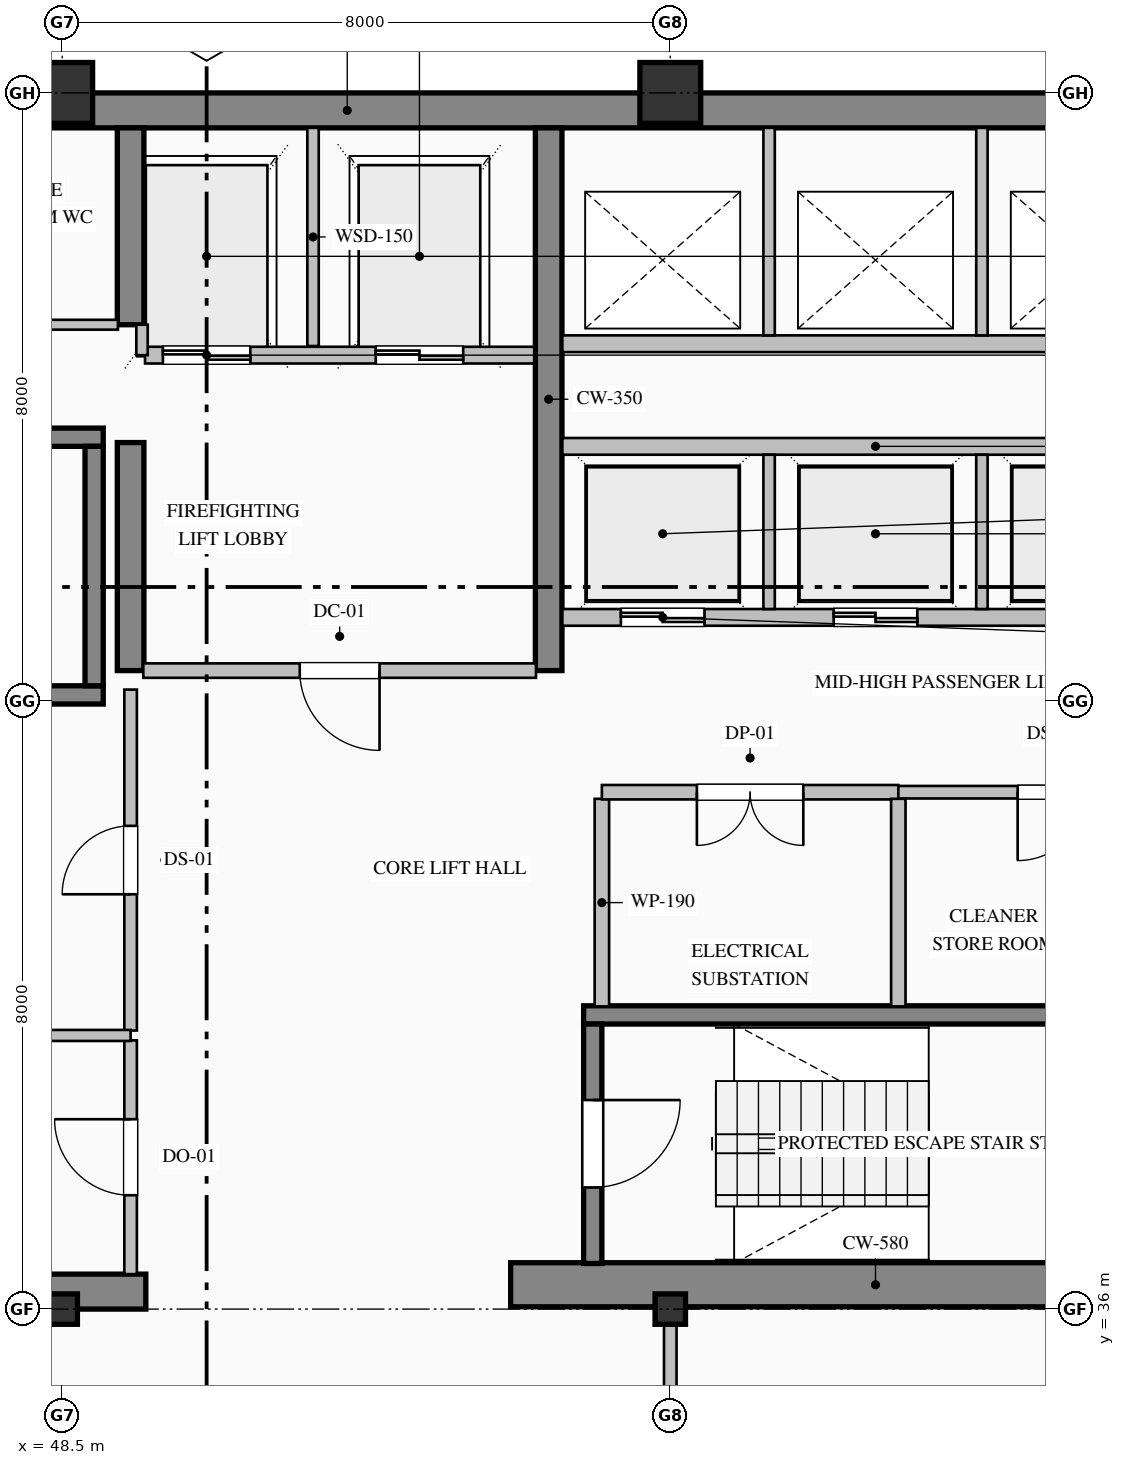
"""IFC4 building model, lengths in metres.
Left out: names, types, materials, properties, quantities, classifications, styles, units other than length and angle.
Written with IfcOpenShell. Run it as: python <this file> out.ifc"""

import sys

from ifc_helpers import new_model, si_unit, direction, frame, frame_2d, origin, origin_2d, place, context, subcontext, project, spatial, rectangle, hollow_rectangle, i_section, extrude, element, fill, save


model = new_model("IFC4")
c1 = context("Model", 3, precision=1e-05, world=origin(), true_north=direction((0.0, 1.0)))
c2 = subcontext(c1, "Body", "Model", "MODEL_VIEW")
j1 = project(units=[si_unit("LENGTHUNIT", "METRE"), si_unit("PLANEANGLEUNIT", "RADIAN")], contexts=[c1])
p1 = place(None, origin())
s1 = spatial("IfcSite", under=j1, at=p1, CompositionType="ELEMENT")
p2 = place(p1, origin())
s2 = spatial("IfcBuilding", under=s1, at=p2, CompositionType="ELEMENT")
p3 = place(p2, frame((0.0, 0.0, 233.8)))
s3 = spatial("IfcBuildingStorey", under=s2, at=p3, CompositionType="ELEMENT", Elevation=233.8)
p4 = place(p3, frame((40.5, 51.77, 0.0), z_axis=(0.0, 0.0, 1.0), x_axis=(1.0, 0.0, 0.0)))
e1 = element("IfcWall", 1, at=p4, inside=s3, PredefinedType="SHEAR", context=c2, shape_type="SweptSolid", body=[
    extrude(rectangle(XDim=23.5, YDim=0.46, at=frame_2d((11.75, 0.0))), origin(), (0.0, 0.0, 1.0), 3.775),
])
p5 = place(p3, frame((40.5, 36.23, 0.0), z_axis=(0.0, 0.0, 1.0), x_axis=(1.0, 0.0, 0.0)))
e2 = element("IfcWall", 2, at=p5, inside=s3, PredefinedType="SHEAR", context=c2, shape_type="SweptSolid", body=[
    extrude(rectangle(XDim=9.1, YDim=0.46, at=frame_2d((4.55, 0.0))), origin(), (0.0, 0.0, 1.0), 3.775),
])
p6 = place(p3, frame((54.4, 36.32, 0.0), z_axis=(0.0, 0.0, 1.0), x_axis=(1.0, 0.0, 0.0)))
e3 = element("IfcWall", 3, at=p6, inside=s3, PredefinedType="SHEAR", context=c2, shape_type="SweptSolid", body=[
    extrude(rectangle(XDim=9.6, YDim=0.58, at=frame_2d((4.8, 0.0))), origin(), (0.0, 0.0, 1.0), 4.0),
])
p7 = place(p3, frame((49.4, 44.4, 0.0), z_axis=(0.0, 0.0, 1.0), x_axis=(0.0, 1.0, 0.0)))
e4 = element("IfcWall", 4, at=p7, inside=s3, PredefinedType="SHEAR", context=c2, shape_type="SweptSolid", body=[
    extrude(rectangle(XDim=3.0, YDim=0.35, at=frame_2d((1.5, 0.0))), origin(), (0.0, 0.0, 1.0), 3.775),
])
p8 = place(p3, frame((49.4, 48.95, 0.0), z_axis=(0.0, 0.0, 1.0), x_axis=(0.0, 1.0, 0.0)))
e5 = element("IfcWall", 5, at=p8, inside=s3, PredefinedType="SHEAR", context=c2, shape_type="SweptSolid", body=[
    extrude(rectangle(XDim=2.59, YDim=0.35, at=frame_2d((1.295, 0.0))), origin(), (0.0, 0.0, 1.0), 3.775),
])
p9 = place(p3, frame((54.9, 44.4, 0.0), z_axis=(0.0, 0.0, 1.0), x_axis=(0.0, 1.0, 0.0)))
e6 = element("IfcWall", 6, at=p9, inside=s3, PredefinedType="SHEAR", context=c2, shape_type="SweptSolid", body=[
    extrude(rectangle(XDim=7.14, YDim=0.35, at=frame_2d((3.57, 0.0))), origin(), (0.0, 0.0, 1.0), 3.775),
])
p10 = place(p3, frame((48.5, 36.0, 0.0), z_axis=(0.0, 0.0, 1.0), x_axis=(1.0, 0.0, 0.0)))
e7 = element("IfcColumn", 7, at=p10, inside=s3, PredefinedType="COLUMN", context=c2, shape_type="SweptSolid", body=[
    extrude(i_section(OverallWidth=0.4, OverallDepth=0.4, WebThickness=0.013, FlangeThickness=0.021, FilletRadius=0.022, at=origin_2d()), origin(), (0.0, 0.0, 1.0), 4.0),
])
p11 = place(p3, frame((48.5, 52.0, 0.0), z_axis=(0.0, 0.0, 1.0), x_axis=(1.0, 0.0, 0.0)))
e8 = element("IfcColumn", 8, at=p11, inside=s3, PredefinedType="COLUMN", context=c2, shape_type="SweptSolid", body=[
    extrude(hollow_rectangle(XDim=0.8, YDim=0.8, WallThickness=0.032, at=origin_2d()), origin(), (0.0, 0.0, 1.0), 4.0),
])
p12 = place(p3, frame((56.5, 36.0, 0.0), z_axis=(0.0, 0.0, 1.0), x_axis=(1.0, 0.0, 0.0)))
e9 = element("IfcColumn", 9, at=p12, inside=s3, PredefinedType="COLUMN", context=c2, shape_type="SweptSolid", body=[
    extrude(i_section(OverallWidth=0.4, OverallDepth=0.4, WebThickness=0.013, FlangeThickness=0.021, FilletRadius=0.022, at=origin_2d()), origin(), (0.0, 0.0, 1.0), 4.0),
])
p13 = place(p3, frame((56.5, 52.0, 0.0), z_axis=(0.0, 0.0, 1.0), x_axis=(1.0, 0.0, 0.0)))
e10 = element("IfcColumn", 10, at=p13, inside=s3, PredefinedType="COLUMN", context=c2, shape_type="SweptSolid", body=[
    extrude(hollow_rectangle(XDim=0.8, YDim=0.8, WallThickness=0.032, at=origin_2d()), origin(), (0.0, 0.0, 1.0), 4.0),
])
for number, where, z_axis, x_axis in (
    (11, (40.96, 47.47, 0.0), (0.0, 0.0, 1.0), (1.0, 0.0, 0.0)),
    (12, (49.04, 44.08, 0.0), (0.0, 0.0, 1.0), (-1.0, 0.0, 0.0)),
):
    element("IfcWall", number, at=place(p3, frame(where, z_axis=z_axis, x_axis=x_axis)), inside=s3, PredefinedType="SOLIDWALL", context=c2, shape_type="SweptSolid", body=[
        extrude(rectangle(XDim=8.08, YDim=0.24, at=frame_2d((4.04, 0.0))), origin(), (0.0, 0.0, 1.0), 4.0),
    ])
p14 = place(p3, frame((48.92, 44.2, 0.0), z_axis=(0.0, 0.0, 1.0), x_axis=(0.0, 1.0, 0.0)))
e13 = element("IfcWall", 13, at=p14, inside=s3, PredefinedType="SOLIDWALL", context=c2, shape_type="SweptSolid", body=[
    extrude(rectangle(XDim=3.15, YDim=0.24, at=frame_2d((1.575, 0.0))), origin(), (0.0, 0.0, 1.0), 4.0),
])
p15 = place(p3, frame((55.36, 39.87, 0.0), z_axis=(0.0, 0.0, 1.0), x_axis=(1.0, 0.0, 0.0)))
e14 = element("IfcWall", 14, at=p15, inside=s3, PredefinedType="SOLIDWALL", context=c2, shape_type="SweptSolid", body=[
    extrude(rectangle(XDim=8.08, YDim=0.24, at=frame_2d((4.04, 0.0))), origin(), (0.0, 0.0, 1.0), 4.0),
])
p16 = place(p3, frame((55.48, 39.75, 0.0), z_axis=(0.0, 0.0, 1.0), x_axis=(0.0, -1.0, 0.0)))
e15 = element("IfcWall", 15, at=p16, inside=s3, PredefinedType="SOLIDWALL", context=c2, shape_type="SweptSolid", body=[
    extrude(rectangle(XDim=3.15, YDim=0.24, at=frame_2d((1.575, 0.0))), origin(), (0.0, 0.0, 1.0), 4.0),
])
p17 = place(p16, frame((1.0, 0.0, 0.0)))
e16 = element("IfcOpeningElement", 16, at=p17, cuts=e15, PredefinedType="OPENING", context=c2, shape_type="SweptSolid", body=[
    extrude(rectangle(XDim=1.15, YDim=2.2, at=frame_2d((0.575, 1.1))), frame((0.0, 0.13, 0.0), z_axis=(0.0, -1.0, 0.0), x_axis=(1.0, 0.0, 0.0)), (0.0, 0.0, 1.0), 0.26),
])
p18 = place(p3, frame((54.71, 48.55, 0.0), z_axis=(0.0, 0.0, 1.0), x_axis=(-1.0, 0.0, 0.0)))
e17 = element("IfcWall", 17, at=p18, inside=s3, PredefinedType="PARTITIONING", context=c2, shape_type="SweptSolid", body=[
    extrude(rectangle(XDim=5.12, YDim=0.22, at=frame_2d((2.56, 0.0))), origin(), (0.0, 0.0, 1.0), 3.775),
])
p19 = place(p18, frame((3.735, 0.0, 0.0)))
e18 = element("IfcOpeningElement", 18, at=p19, cuts=e17, PredefinedType="OPENING", context=c2, shape_type="SweptSolid", body=[
    extrude(rectangle(XDim=1.15, YDim=2.2, at=frame_2d((0.575, 1.1))), frame((0.0, 0.12, 0.0), z_axis=(0.0, -1.0, 0.0), x_axis=(1.0, 0.0, 0.0)), (0.0, 0.0, 1.0), 0.24),
])
p20 = place(p18, frame((0.935, 0.0, 0.0)))
e19 = element("IfcOpeningElement", 19, at=p20, cuts=e17, PredefinedType="OPENING", context=c2, shape_type="SweptSolid", body=[
    extrude(rectangle(XDim=1.15, YDim=2.2, at=frame_2d((0.575, 1.1))), frame((0.0, 0.12, 0.0), z_axis=(0.0, -1.0, 0.0), x_axis=(1.0, 0.0, 0.0)), (0.0, 0.0, 1.0), 0.24),
])
p21 = place(p3, frame((51.8, 48.67, 0.0), z_axis=(0.0, 0.0, 1.0), x_axis=(0.0, 1.0, 0.0)))
e20 = element("IfcWall", 20, at=p21, inside=s3, PredefinedType="PARTITIONING", context=c2, shape_type="SweptSolid", body=[
    extrude(rectangle(XDim=2.87, YDim=0.15, at=frame_2d((1.435, 0.0))), origin(), (0.0, 0.0, 1.0), 3.775),
])
p22 = place(p3, frame((49.55, 48.55, 0.0), z_axis=(0.0, 0.0, 1.0), x_axis=(0.0, 1.0, 0.0)))
e21 = element("IfcWall", 21, at=p22, inside=s3, PredefinedType="PARTITIONING", context=c2, shape_type="SweptSolid", body=[
    extrude(rectangle(XDim=0.4, YDim=0.15, at=frame_2d((0.2, 0.0))), origin(), (0.0, 0.0, 1.0), 3.775),
])
p23 = place(p3, frame((63.32, 45.1, 0.0), z_axis=(0.0, 0.0, 1.0), x_axis=(-1.0, 0.0, 0.0)))
e22 = element("IfcWall", 22, at=p23, inside=s3, PredefinedType="PARTITIONING", context=c2, shape_type="SweptSolid", body=[
    extrude(rectangle(XDim=8.24, YDim=0.22, at=frame_2d((4.12, 0.0))), origin(), (0.0, 0.0, 1.0), 3.775),
])
p24 = place(p23, frame((6.37, 0.0, 0.0)))
e23 = element("IfcOpeningElement", 23, at=p24, cuts=e22, PredefinedType="OPENING", context=c2, shape_type="SweptSolid", body=[
    extrude(rectangle(XDim=1.1, YDim=2.2, at=frame_2d((0.55, 1.1))), frame((0.0, 0.12, 0.0), z_axis=(0.0, -1.0, 0.0), x_axis=(1.0, 0.0, 0.0)), (0.0, 0.0, 1.0), 0.24),
])
p25 = place(p23, frame((3.57, 0.0, 0.0)))
e24 = element("IfcOpeningElement", 24, at=p25, cuts=e22, PredefinedType="OPENING", context=c2, shape_type="SweptSolid", body=[
    extrude(rectangle(XDim=1.1, YDim=2.2, at=frame_2d((0.55, 1.1))), frame((0.0, 0.12, 0.0), z_axis=(0.0, -1.0, 0.0), x_axis=(1.0, 0.0, 0.0)), (0.0, 0.0, 1.0), 0.24),
])
p26 = place(p23, frame((0.77, 0.0, 0.0)))
e25 = element("IfcOpeningElement", 25, at=p26, cuts=e22, PredefinedType="OPENING", context=c2, shape_type="SweptSolid", body=[
    extrude(rectangle(XDim=1.1, YDim=2.2, at=frame_2d((0.55, 1.1))), frame((0.0, 0.12, 0.0), z_axis=(0.0, -1.0, 0.0), x_axis=(1.0, 0.0, 0.0)), (0.0, 0.0, 1.0), 0.24),
])
p27 = place(p3, frame((55.08, 47.35, 0.0), z_axis=(0.0, 0.0, 1.0), x_axis=(1.0, 0.0, 0.0)))
e26 = element("IfcWall", 26, at=p27, inside=s3, PredefinedType="PARTITIONING", context=c2, shape_type="SweptSolid", body=[
    extrude(rectangle(XDim=8.24, YDim=0.22, at=frame_2d((4.12, 0.0))), origin(), (0.0, 0.0, 1.0), 3.775),
])
for number, where, z_axis, x_axis in (
    (27, (57.8, 45.21, 0.0), (0.0, 0.0, 1.0), (0.0, 1.0, 0.0)),
    (28, (60.6, 45.21, 0.0), (0.0, 0.0, 1.0), (0.0, 1.0, 0.0)),
):
    element("IfcWall", number, at=place(p3, frame(where, z_axis=z_axis, x_axis=x_axis)), inside=s3, PredefinedType="PARTITIONING", context=c2, shape_type="SweptSolid", body=[
        extrude(rectangle(XDim=2.03, YDim=0.15, at=frame_2d((1.015, 0.0))), origin(), (0.0, 0.0, 1.0), 3.775),
    ])
p28 = place(p3, frame((63.32, 48.7, 0.0), z_axis=(0.0, 0.0, 1.0), x_axis=(-1.0, 0.0, 0.0)))
e29 = element("IfcWall", 29, at=p28, inside=s3, PredefinedType="PARTITIONING", context=c2, shape_type="SweptSolid", body=[
    extrude(rectangle(XDim=8.24, YDim=0.22, at=frame_2d((4.12, 0.0))), origin(), (0.0, 0.0, 1.0), 3.775),
])
for number, where, z_axis, x_axis in (
    (30, (57.8, 48.81, 0.0), (0.0, 0.0, 1.0), (0.0, 1.0, 0.0)),
    (31, (60.6, 48.81, 0.0), (0.0, 0.0, 1.0), (0.0, 1.0, 0.0)),
):
    element("IfcWall", number, at=place(p3, frame(where, z_axis=z_axis, x_axis=x_axis)), inside=s3, PredefinedType="PARTITIONING", context=c2, shape_type="SweptSolid", body=[
        extrude(rectangle(XDim=2.73, YDim=0.15, at=frame_2d((1.365, 0.0))), origin(), (0.0, 0.0, 1.0), 3.775),
    ])
p29 = place(p3, frame((45.2, 48.95, 0.0), z_axis=(0.0, 0.0, 1.0), x_axis=(1.0, 0.0, 0.0)))
e32 = element("IfcWall", 32, at=p29, inside=s3, PredefinedType="PARTITIONING", context=c2, shape_type="SweptSolid", body=[
    extrude(rectangle(XDim=4.033, YDim=0.13, at=frame_2d((2.017, 0.0))), origin(), (0.0, 0.0, 1.0), 3.775),
])
p30 = place(p29, frame((1.556, 0.0, 0.0)))
e33 = element("IfcOpeningElement", 33, at=p30, cuts=e32, PredefinedType="OPENING", context=c2, shape_type="SweptSolid", body=[
    extrude(rectangle(XDim=0.92, YDim=2.15, at=frame_2d((0.46, 1.075))), frame((0.0, 0.075, 0.0), z_axis=(0.0, -1.0, 0.0), x_axis=(1.0, 0.0, 0.0)), (0.0, 0.0, 1.0), 0.15),
])
p31 = place(p3, frame((54.733, 44.4, 0.0), z_axis=(0.0, 0.0, 1.0), x_axis=(-1.0, 0.0, 0.0)))
e34 = element("IfcWall", 34, at=p31, inside=s3, PredefinedType="PARTITIONING", context=c2, shape_type="SweptSolid", body=[
    extrude(rectangle(XDim=5.166, YDim=0.19, at=frame_2d((2.583, 0.0))), origin(), (0.0, 0.0, 1.0), 3.775),
])
p32 = place(p31, frame((2.058, 0.0, 0.0)))
e35 = element("IfcOpeningElement", 35, at=p32, cuts=e34, PredefinedType="OPENING", context=c2, shape_type="SweptSolid", body=[
    extrude(rectangle(XDim=1.05, YDim=2.15, at=frame_2d((0.525, 1.075))), frame((0.0, 0.105, 0.0), z_axis=(0.0, -1.0, 0.0), x_axis=(1.0, 0.0, 0.0)), (0.0, 0.0, 1.0), 0.21),
])
p33 = place(p3, frame((49.4, 36.46, 0.0), z_axis=(0.0, 0.0, 1.0), x_axis=(0.0, 1.0, 0.0)))
e36 = element("IfcWall", 36, at=p33, inside=s3, PredefinedType="PARTITIONING", context=c2, shape_type="SweptSolid", body=[
    extrude(rectangle(XDim=3.075, YDim=0.165, at=frame_2d((1.538, 0.0))), origin(), (0.0, 0.0, 1.0), 3.017),
])
p34 = place(p33, frame((1.038, 0.0, 0.0)))
e37 = element("IfcOpeningElement", 37, at=p34, cuts=e36, PredefinedType="OPENING", context=c2, shape_type="SweptSolid", body=[
    extrude(rectangle(XDim=1.0, YDim=2.15, at=frame_2d((0.5, 1.075))), frame((0.0, 0.093, 0.0), z_axis=(0.0, -1.0, 0.0), x_axis=(1.0, 0.0, 0.0)), (0.0, 0.0, 1.0), 0.185),
])
p35 = place(p3, frame((49.4, 39.665, 0.0), z_axis=(0.0, 0.0, 1.0), x_axis=(0.0, 1.0, 0.0)))
e38 = element("IfcWall", 38, at=p35, inside=s3, PredefinedType="PARTITIONING", context=c2, shape_type="SweptSolid", body=[
    extrude(rectangle(XDim=4.485, YDim=0.165, at=frame_2d((2.243, 0.0))), origin(), (0.0, 0.0, 1.0), 3.017),
])
p36 = place(p35, frame((1.793, 0.0, 0.0)))
e39 = element("IfcOpeningElement", 39, at=p36, cuts=e38, PredefinedType="OPENING", context=c2, shape_type="SweptSolid", body=[
    extrude(rectangle(XDim=0.9, YDim=2.15, at=frame_2d((0.45, 1.075))), frame((0.0, 0.093, 0.0), z_axis=(0.0, -1.0, 0.0), x_axis=(1.0, 0.0, 0.0)), (0.0, 0.0, 1.0), 0.185),
])
p37 = place(p3, frame((55.6, 42.713, 0.0), z_axis=(0.0, 0.0, 1.0), x_axis=(0.0, -1.0, 0.0)))
e40 = element("IfcWall", 40, at=p37, inside=s3, PredefinedType="PARTITIONING", context=c2, shape_type="SweptSolid", body=[
    extrude(rectangle(XDim=2.731, YDim=0.19, at=frame_2d((1.365, 0.0))), origin(), (0.0, 0.0, 1.0), 3.775),
])
p38 = place(p3, frame((40.96, 39.6, 0.0), z_axis=(0.0, 0.0, 1.0), x_axis=(1.0, 0.0, 0.0)))
e41 = element("IfcWall", 41, at=p38, inside=s3, PredefinedType="PARTITIONING", context=c2, shape_type="SweptSolid", body=[
    extrude(rectangle(XDim=8.44, YDim=0.145, at=frame_2d((4.22, 0.0))), origin(), (0.0, 0.0, 1.0), 3.775),
])
p39 = place(p3, frame((59.5, 42.8, 0.0), z_axis=(0.0, 0.0, 1.0), x_axis=(-1.0, 0.0, 0.0)))
e42 = element("IfcWall", 42, at=p39, inside=s3, PredefinedType="PARTITIONING", context=c2, shape_type="SweptSolid", body=[
    extrude(rectangle(XDim=3.9, YDim=0.19, at=frame_2d((1.95, 0.0))), origin(), (0.0, 0.0, 1.0), 3.775),
])
p40 = place(p39, frame((1.25, 0.0, 0.0)))
e43 = element("IfcOpeningElement", 43, at=p40, cuts=e42, PredefinedType="OPENING", context=c2, shape_type="SweptSolid", body=[
    extrude(rectangle(XDim=1.4, YDim=2.25, at=frame_2d((0.7, 1.125))), frame((0.0, 0.105, 0.0), z_axis=(0.0, -1.0, 0.0), x_axis=(1.0, 0.0, 0.0)), (0.0, 0.0, 1.0), 0.21),
])
p41 = place(p3, frame((63.54, 42.8, 0.0), z_axis=(0.0, 0.0, 1.0), x_axis=(-1.0, 0.0, 0.0)))
e44 = element("IfcWall", 44, at=p41, inside=s3, PredefinedType="PARTITIONING", context=c2, shape_type="SweptSolid", body=[
    extrude(rectangle(XDim=4.04, YDim=0.165, at=frame_2d((2.02, 0.0))), origin(), (0.0, 0.0, 1.0), 3.775),
])
p42 = place(p41, frame((1.57, 0.0, 0.0)))
e45 = element("IfcOpeningElement", 45, at=p42, cuts=e44, PredefinedType="OPENING", context=c2, shape_type="SweptSolid", body=[
    extrude(rectangle(XDim=0.9, YDim=2.15, at=frame_2d((0.45, 1.075))), frame((0.0, 0.093, 0.0), z_axis=(0.0, -1.0, 0.0), x_axis=(1.0, 0.0, 0.0)), (0.0, 0.0, 1.0), 0.185),
])
p43 = place(p3, frame((59.5, 42.713, 0.0), z_axis=(0.0, 0.0, 1.0), x_axis=(0.0, -1.0, 0.0)))
e46 = element("IfcWall", 46, at=p43, inside=s3, PredefinedType="PARTITIONING", context=c2, shape_type="SweptSolid", body=[
    extrude(rectangle(XDim=2.731, YDim=0.19, at=frame_2d((1.365, 0.0))), origin(), (0.0, 0.0, 1.0), 3.775),
])
p44 = place(p3, frame((56.5, 36.0, 0.0), z_axis=(0.0, 0.0, 1.0), x_axis=(0.0, -1.0, 0.0)))
e47 = element("IfcWall", 47, at=p44, inside=s3, PredefinedType="PARTITIONING", context=c2, shape_type="SweptSolid", body=[
    extrude(rectangle(XDim=5.525, YDim=0.165, at=frame_2d((2.763, 0.0))), origin(), (0.0, 0.0, 1.0), 3.179),
])
p45 = place(p17, origin())
e48 = element("IfcDoor", 48, at=p45, inside=s3, OperationType="SINGLE_SWING_LEFT", PredefinedType="DOOR", context=c2, shape_type="SweptSolid", body=[
    extrude(rectangle(XDim=1.15, YDim=2.2, at=frame_2d((0.575, 1.1))), frame((0.0, 0.025, 0.0), z_axis=(0.0, -1.0, 0.0), x_axis=(1.0, 0.0, 0.0)), (0.0, 0.0, 1.0), 0.05),
])
fill(e16, e48)
p46 = place(p19, origin())
e49 = element("IfcDoor", 49, at=p46, inside=s3, OperationType="DOUBLE_DOOR_SLIDING", PredefinedType="DOOR", context=c2, shape_type="SweptSolid", body=[
    extrude(rectangle(XDim=1.15, YDim=2.2, at=frame_2d((0.575, 1.1))), frame((0.0, 0.025, 0.0), z_axis=(0.0, -1.0, 0.0), x_axis=(1.0, 0.0, 0.0)), (0.0, 0.0, 1.0), 0.05),
])
fill(e18, e49)
p47 = place(p20, origin())
e50 = element("IfcDoor", 50, at=p47, inside=s3, OperationType="DOUBLE_DOOR_SLIDING", PredefinedType="DOOR", context=c2, shape_type="SweptSolid", body=[
    extrude(rectangle(XDim=1.15, YDim=2.2, at=frame_2d((0.575, 1.1))), frame((0.0, 0.025, 0.0), z_axis=(0.0, -1.0, 0.0), x_axis=(1.0, 0.0, 0.0)), (0.0, 0.0, 1.0), 0.05),
])
fill(e19, e50)
p48 = place(p24, origin())
e51 = element("IfcDoor", 51, at=p48, inside=s3, OperationType="DOUBLE_DOOR_SLIDING", PredefinedType="DOOR", context=c2, shape_type="SweptSolid", body=[
    extrude(rectangle(XDim=1.1, YDim=2.2, at=frame_2d((0.55, 1.1))), frame((0.0, 0.025, 0.0), z_axis=(0.0, -1.0, 0.0), x_axis=(1.0, 0.0, 0.0)), (0.0, 0.0, 1.0), 0.05),
])
fill(e23, e51)
p49 = place(p25, origin())
e52 = element("IfcDoor", 52, at=p49, inside=s3, OperationType="DOUBLE_DOOR_SLIDING", PredefinedType="DOOR", context=c2, shape_type="SweptSolid", body=[
    extrude(rectangle(XDim=1.1, YDim=2.2, at=frame_2d((0.55, 1.1))), frame((0.0, 0.025, 0.0), z_axis=(0.0, -1.0, 0.0), x_axis=(1.0, 0.0, 0.0)), (0.0, 0.0, 1.0), 0.05),
])
fill(e24, e52)
p50 = place(p32, origin())
e53 = element("IfcDoor", 53, at=p50, inside=s3, OperationType="SINGLE_SWING_LEFT", PredefinedType="DOOR", context=c2, shape_type="SweptSolid", body=[
    extrude(rectangle(XDim=1.05, YDim=2.15, at=frame_2d((0.525, 1.075))), frame((0.0, 0.025, 0.0), z_axis=(0.0, -1.0, 0.0), x_axis=(1.0, 0.0, 0.0)), (0.0, 0.0, 1.0), 0.05),
])
fill(e35, e53)
p51 = place(p34, origin())
e54 = element("IfcDoor", 54, at=p51, inside=s3, OperationType="SINGLE_SWING_RIGHT", PredefinedType="DOOR", context=c2, shape_type="SweptSolid", body=[
    extrude(rectangle(XDim=1.0, YDim=2.15, at=frame_2d((0.5, 1.075))), frame((0.0, 0.025, 0.0), z_axis=(0.0, -1.0, 0.0), x_axis=(1.0, 0.0, 0.0)), (0.0, 0.0, 1.0), 0.05),
])
fill(e37, e54)
p52 = place(p36, origin())
e55 = element("IfcDoor", 55, at=p52, inside=s3, OperationType="SINGLE_SWING_LEFT", PredefinedType="DOOR", context=c2, shape_type="SweptSolid", body=[
    extrude(rectangle(XDim=0.9, YDim=2.15, at=frame_2d((0.45, 1.075))), frame((0.0, 0.025, 0.0), z_axis=(0.0, -1.0, 0.0), x_axis=(1.0, 0.0, 0.0)), (0.0, 0.0, 1.0), 0.05),
])
fill(e39, e55)
p53 = place(p40, origin())
e56 = element("IfcDoor", 56, at=p53, inside=s3, OperationType="DOUBLE_DOOR_SINGLE_SWING", PredefinedType="DOOR", context=c2, shape_type="SweptSolid", body=[
    extrude(rectangle(XDim=1.4, YDim=2.25, at=frame_2d((0.7, 1.125))), frame((0.0, 0.025, 0.0), z_axis=(0.0, -1.0, 0.0), x_axis=(1.0, 0.0, 0.0)), (0.0, 0.0, 1.0), 0.05),
])
fill(e43, e56)
p54 = place(p42, origin())
e57 = element("IfcDoor", 57, at=p54, inside=s3, OperationType="SINGLE_SWING_RIGHT", PredefinedType="DOOR", context=c2, shape_type="SweptSolid", body=[
    extrude(rectangle(XDim=0.9, YDim=2.15, at=frame_2d((0.45, 1.075))), frame((0.0, 0.025, 0.0), z_axis=(0.0, -1.0, 0.0), x_axis=(1.0, 0.0, 0.0)), (0.0, 0.0, 1.0), 0.05),
])
fill(e45, e57)
save(model, sys.argv[1])
